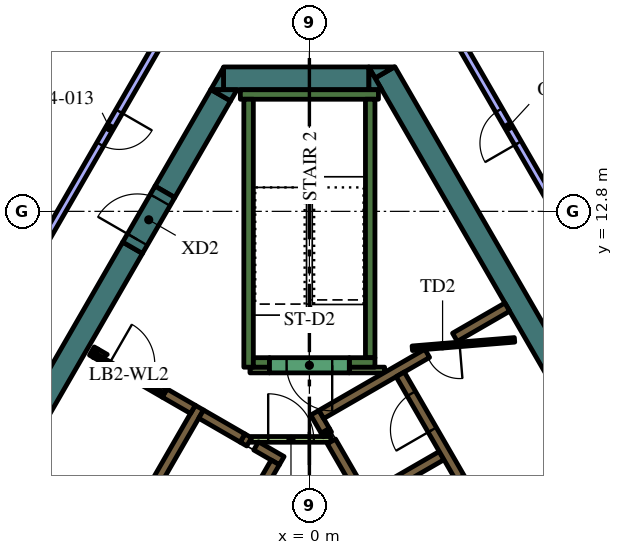
"""IFC4 building model, lengths in metres.
Left out: names, types, materials, properties, quantities, classifications, styles, units other than length and angle.
Written with IfcOpenShell. Run it as: python <this file> out.ifc"""

import sys

from ifc_helpers import new_model, si_unit, direction, frame, frame_2d, origin, place, context, subcontext, project, spatial, polyline, rectangle, outline, extrude, element, fill, save


model = new_model("IFC4")
c1 = context("Model", 3, precision=1e-05, world=origin(), true_north=direction((0.0, 1.0)))
c2 = subcontext(c1, "Body", "Model", "MODEL_VIEW")
j1 = project(units=[si_unit("LENGTHUNIT", "METRE"), si_unit("PLANEANGLEUNIT", "RADIAN")], contexts=[c1])
p1 = place(None, origin())
s1 = spatial("IfcSite", under=j1, at=p1, CompositionType="ELEMENT")
p2 = place(p1, origin())
s2 = spatial("IfcBuilding", under=s1, at=p2, CompositionType="ELEMENT")
p3 = place(p2, frame((0.0, 0.0, 313.2)))
s3 = spatial("IfcBuildingStorey", under=s2, at=p3, CompositionType="ELEMENT", Elevation=313.2)
p4 = place(p3, frame((1.989, 16.456, 0.0), z_axis=(0.0, 0.0, 1.0), x_axis=(0.49999102663, -0.8660305845, 0.0)))
e1 = element("IfcWall", 1, at=p4, inside=s3, PredefinedType="SOLIDWALL", context=c2, shape_type="SweptSolid", body=[
    extrude(rectangle(XDim=12.406, YDim=0.6, at=frame_2d((6.203, 0.0))), origin(), (0.0, 0.0, 1.0), 4.2),
])
p5 = place(p3, origin())
e2 = element("IfcWall", 2, at=p5, inside=s3, PredefinedType="SOLIDWALL", context=c2, shape_type="SweptSolid", body=[
    extrude(outline(polyline([(1.559, 16.6), (2.235, 16.6), (1.728, 16.307), (1.559, 16.6)])), origin(), (0.0, 0.0, 1.0), 4.2),
])
p6 = place(p3, frame((-2.258, 16.3, 0.0), z_axis=(0.0, 0.0, 1.0), x_axis=(1.0, 0.0, 0.0)))
e3 = element("IfcWall", 3, at=p6, inside=s3, PredefinedType="SOLIDWALL", context=c2, shape_type="SweptSolid", body=[
    extrude(rectangle(XDim=3.823, YDim=0.6, at=frame_2d((1.912, 0.0))), origin(), (0.0, 0.0, 1.0), 4.2),
])
e4 = element("IfcWall", 4, at=p5, inside=s3, PredefinedType="SOLIDWALL", context=c2, shape_type="SweptSolid", body=[
    extrude(outline(polyline([(1.905, 16.0), (1.567, 16.0), (1.567, 16.585), (1.905, 16.0)])), origin(), (0.0, 0.0, 1.0), 4.2),
])
e5 = element("IfcWall", 5, at=p5, inside=s3, PredefinedType="SOLIDWALL", context=c2, shape_type="SweptSolid", body=[
    extrude(outline(polyline([(-2.598, 16.0), (-2.26, 16.585), (-2.26, 16.0), (-2.598, 16.0)])), origin(), (0.0, 0.0, 1.0), 4.2),
])
p7 = place(p3, frame((-2.335, 15.855, 0.0), z_axis=(0.0, 0.0, 1.0), x_axis=(-0.499960127962, -0.866048422692, 0.0)))
e6 = element("IfcWall", 6, at=p7, inside=s3, PredefinedType="SOLIDWALL", context=c2, shape_type="SweptSolid", body=[
    extrude(rectangle(XDim=2.934, YDim=0.6, at=frame_2d((1.467, 0.0))), origin(), (0.0, 0.0, 1.0), 4.2),
])
e7 = element("IfcWall", 7, at=p5, inside=s3, PredefinedType="SOLIDWALL", context=c2, shape_type="SweptSolid", body=[
    extrude(outline(polyline([(-1.905, 16.0), (-2.074, 15.707), (-2.581, 16.0), (-1.905, 16.0)])), origin(), (0.0, 0.0, 1.0), 4.2),
])
p8 = place(p3, frame((-12.582, -1.892, 0.0), z_axis=(0.0, 0.0, 1.0), x_axis=(0.500003640647, 0.866023301845, 0.0)))
e8 = element("IfcWall", 8, at=p8, inside=s3, PredefinedType="SOLIDWALL", context=c2, shape_type="SweptSolid", body=[
    extrude(rectangle(XDim=15.858, YDim=0.6, at=frame_2d((7.929, 0.0))), origin(), (0.0, 0.0, 1.0), 4.2),
])
p9 = place(p3, frame((-1.817, 15.875, 0.0), z_axis=(0.0, 0.0, 1.0), x_axis=(1.0, 0.0, 0.0)))
e9 = element("IfcWall", 9, at=p9, inside=s3, PredefinedType="SOLIDWALL", context=c2, shape_type="SweptSolid", body=[
    extrude(rectangle(XDim=3.634, YDim=0.25, at=frame_2d((1.817, 0.0))), origin(), (0.0, 0.0, 1.0), 4.2),
])
p10 = place(p3, frame((1.6, 8.95, 0.0), z_axis=(0.0, 0.0, 1.0), x_axis=(0.0, 1.0, 0.0)))
e10 = element("IfcWall", 10, at=p10, inside=s3, PredefinedType="SOLIDWALL", context=c2, shape_type="SweptSolid", body=[
    extrude(rectangle(XDim=6.8, YDim=0.25, at=frame_2d((3.4, 0.0))), origin(), (0.0, 0.0, 1.0), 4.2),
])
p11 = place(p3, frame((1.05, 8.825, 0.0), z_axis=(0.0, 0.0, 1.0), x_axis=(1.0, 0.0, 0.0)))
e11 = element("IfcWall", 11, at=p11, inside=s3, PredefinedType="SOLIDWALL", context=c2, shape_type="SweptSolid", body=[
    extrude(rectangle(XDim=0.675, YDim=0.25, at=frame_2d((0.337, 0.0))), origin(), (0.0, 0.0, 1.0), 4.2),
])
p12 = place(p3, frame((-1.6, 8.7, 0.0), z_axis=(0.0, 0.0, 1.0), x_axis=(0.0, 1.0, 0.0)))
e12 = element("IfcWall", 12, at=p12, inside=s3, PredefinedType="SOLIDWALL", context=c2, shape_type="SweptSolid", body=[
    extrude(rectangle(XDim=7.05, YDim=0.25, at=frame_2d((3.525, 0.0))), origin(), (0.0, 0.0, 1.0), 4.2),
])
p13 = place(p3, frame((-1.475, 8.825, 0.0), z_axis=(0.0, 0.0, 1.0), x_axis=(1.0, 0.0, 0.0)))
e13 = element("IfcWall", 13, at=p13, inside=s3, PredefinedType="SOLIDWALL", context=c2, shape_type="SweptSolid", body=[
    extrude(rectangle(XDim=0.425, YDim=0.25, at=frame_2d((0.212, 0.0))), origin(), (0.0, 0.0, 1.0), 4.2),
])
p14 = place(p3, frame((0.473, 6.93, 0.0), z_axis=(0.0, 0.0, 1.0), x_axis=(-0.49972245349, 0.866185586049, 0.0)))
e14 = element("IfcWall", 14, at=p14, inside=s3, PredefinedType="SOLIDWALL", context=c2, shape_type="SweptSolid", body=[
    extrude(rectangle(XDim=0.11, YDim=0.25, at=frame_2d((0.055, 0.0))), origin(), (0.0, 0.0, 1.0), 4.2),
])
p15 = place(p3, frame((6.568, -3.627, 0.0), z_axis=(0.0, 0.0, 1.0), x_axis=(-0.499999455981, 0.866025717874, 0.0)))
e15 = element("IfcWall", 15, at=p15, inside=s3, PredefinedType="SOLIDWALL", context=c2, shape_type="SweptSolid", body=[
    extrude(rectangle(XDim=11.978, YDim=0.25, at=frame_2d((5.989, 0.0))), origin(), (0.0, 0.0, 1.0), 4.2),
])
p16 = place(p3, frame((0.417, 7.027, 0.0), z_axis=(0.0, 0.0, 1.0), x_axis=(-0.500210807569, 0.865903659763, 0.0)))
e16 = element("IfcWall", 16, at=p16, inside=s3, PredefinedType="SOLIDWALL", context=c2, shape_type="SweptSolid", body=[
    extrude(rectangle(XDim=0.548, YDim=0.25, at=frame_2d((0.274, 0.0))), origin(), (0.0, 0.0, 1.0), 4.2),
])
p17 = place(p3, frame((3.1, 9.064, 0.0), z_axis=(0.0, 0.0, 1.0), x_axis=(-0.866030133475, -0.499991807846, 0.0)))
e17 = element("IfcWall", 17, at=p17, inside=s3, PredefinedType="SOLIDWALL", context=c2, shape_type="SweptSolid", body=[
    extrude(rectangle(XDim=3.217, YDim=0.25, at=frame_2d((1.608, 0.0))), origin(), (0.0, 0.0, 1.0), 4.2),
])
p18 = place(p3, frame((1.574, 5.274, 0.0), z_axis=(0.0, 0.0, 1.0), x_axis=(0.866028486751, 0.499994660107, 0.0)))
e18 = element("IfcWall", 18, at=p18, inside=s3, PredefinedType="SOLIDWALL", context=c2, shape_type="SweptSolid", body=[
    extrude(rectangle(XDim=2.2, YDim=0.25, at=frame_2d((1.1, 0.0))), origin(), (0.0, 0.0, 1.0), 4.2),
])
p19 = place(p3, frame((3.83, 9.486, 0.0), z_axis=(0.0, 0.0, 1.0), x_axis=(0.865986202621, 0.500067892261, 0.0)))
e19 = element("IfcWall", 19, at=p19, inside=s3, PredefinedType="SOLIDWALL", context=c2, shape_type="SweptSolid", body=[
    extrude(rectangle(XDim=1.591, YDim=0.25, at=frame_2d((0.795, 0.0))), origin(), (0.0, 0.0, 1.0), 4.2),
])
p20 = place(p3, frame((-8.06, -1.311, 0.0), z_axis=(0.0, 0.0, 1.0), x_axis=(0.50000273126, 0.866023826885, 0.0)))
e20 = element("IfcWall", 20, at=p20, inside=s3, PredefinedType="SOLIDWALL", context=c2, shape_type="SweptSolid", body=[
    extrude(rectangle(XDim=10.33, YDim=0.25, at=frame_2d((5.165, 0.0))), origin(), (0.0, 0.0, 1.0), 4.2),
])
p21 = place(p3, frame((-1.758, 6.835, 0.0), z_axis=(0.0, 0.0, 1.0), x_axis=(0.865982457891, -0.500074377092, 0.0)))
e21 = element("IfcWall", 21, at=p21, inside=s3, PredefinedType="SOLIDWALL", context=c2, shape_type="SweptSolid", body=[
    extrude(rectangle(XDim=0.2, YDim=0.25, at=frame_2d((0.1, 0.0))), origin(), (0.0, 0.0, 1.0), 4.2),
])
p22 = place(p3, frame((-1.76, 6.836, 0.0), z_axis=(0.0, 0.0, 1.0), x_axis=(-0.865952863304, 0.500125622755, 0.0)))
e22 = element("IfcWall", 22, at=p22, inside=s3, PredefinedType="SOLIDWALL", context=c2, shape_type="SweptSolid", body=[
    extrude(rectangle(XDim=1.258, YDim=0.25, at=frame_2d((0.629, 0.0))), origin(), (0.0, 0.0, 1.0), 4.2),
])
p23 = place(p3, frame((-0.728, 6.24, 0.0), z_axis=(0.0, 0.0, 1.0), x_axis=(-0.865955664968, 0.500120771724, 0.0)))
e23 = element("IfcWall", 23, at=p23, inside=s3, PredefinedType="SOLIDWALL", context=c2, shape_type="SweptSolid", body=[
    extrude(rectangle(XDim=0.778, YDim=0.25, at=frame_2d((0.389, 0.0))), origin(), (0.0, 0.0, 1.0), 4.2),
])
p24 = place(p3, frame((-5.725, 9.125, 0.0), z_axis=(0.0, 0.0, 1.0), x_axis=(0.866185586049, -0.49972245349, 0.0)))
e24 = element("IfcWall", 24, at=p24, inside=s3, PredefinedType="SOLIDWALL", context=c2, shape_type="SweptSolid", body=[
    extrude(rectangle(XDim=0.11, YDim=0.25, at=frame_2d((0.055, 0.0))), origin(), (0.0, 0.0, 1.0), 4.2),
])
p25 = place(p3, frame((-3.066, 7.59, 0.0), z_axis=(0.0, 0.0, 1.0), x_axis=(-0.866081358704, 0.49990307071, 0.0)))
e25 = element("IfcWall", 25, at=p25, inside=s3, PredefinedType="SOLIDWALL", context=c2, shape_type="SweptSolid", body=[
    extrude(rectangle(XDim=0.858, YDim=0.25, at=frame_2d((0.429, 0.0))), origin(), (0.0, 0.0, 1.0), 4.2),
])
e26 = element("IfcWall", 26, at=p5, inside=s3, PredefinedType="SOLIDWALL", context=c2, shape_type="SweptSolid", body=[
    extrude(outline(polyline([(-3.748, 8.128), (-3.813, 8.015), (-4.027, 8.139), (-4.017, 8.156), (-4.008, 8.173), (-4.0, 8.192), (-3.995, 8.21), (-3.991, 8.23), (-3.99, 8.25), (-3.99, 8.268), (-3.748, 8.128)])), origin(), (0.0, 0.0, 1.0), 4.2),
])
e27 = element("IfcWall", 27, at=p5, inside=s3, PredefinedType="SOLIDWALL", context=c2, shape_type="SweptSolid", body=[
    extrude(outline(polyline([(-5.689, 8.96), (-5.69, 8.961), (-5.565, 9.177), (-5.319, 9.035), (-5.335, 9.026), (-5.351, 9.015), (-5.366, 9.002), (-5.379, 8.988), (-5.392, 8.972), (-5.402, 8.956), (-5.412, 8.939), (-5.629, 9.064), (-5.629, 9.064), (-5.689, 8.96)])), origin(), (0.0, 0.0, 1.0), 4.2),
])
p26 = place(p3, frame((1.05, 8.625, 0.0), z_axis=(0.0, 0.0, 1.0), x_axis=(1.0, 0.0, 0.0)))
e28 = element("IfcWall", 28, at=p26, inside=s3, PredefinedType="PARTITIONING", context=c2, shape_type="SweptSolid", body=[
    extrude(rectangle(XDim=0.929, YDim=0.15, at=frame_2d((0.464, 0.0))), origin(), (0.0, 0.0, 1.0), 3.55),
])
p27 = place(p3, frame((-1.564, 8.625, 0.0), z_axis=(0.0, 0.0, 1.0), x_axis=(1.0, 0.0, 0.0)))
e29 = element("IfcWall", 29, at=p27, inside=s3, PredefinedType="PARTITIONING", context=c2, shape_type="SweptSolid", body=[
    extrude(rectangle(XDim=0.514, YDim=0.15, at=frame_2d((0.257, 0.0))), origin(), (0.0, 0.0, 1.0), 3.55),
])
p28 = place(p3, frame((8.565, -2.185, 0.0), z_axis=(0.0, 0.0, 1.0), x_axis=(-0.499997954832, 0.866026584559, 0.0)))
e30 = element("IfcWall", 30, at=p28, inside=s3, PredefinedType="SOLIDWALL", context=c2, shape_type="SweptSolid", body=[
    extrude(rectangle(XDim=12.35, YDim=0.25, at=frame_2d((6.175, 0.0))), origin(), (0.0, 0.0, 1.0), 4.2),
])
p29 = place(p28, frame((0.685, 0.0, 0.0)))
e31 = element("IfcOpeningElement", 31, at=p29, cuts=e30, PredefinedType="OPENING", context=c2, shape_type="SweptSolid", body=[
    extrude(rectangle(XDim=0.9, YDim=2.1, at=frame_2d((0.45, 1.05))), frame((0.0, 0.135, 0.0), z_axis=(0.0, -1.0, 0.0), x_axis=(1.0, 0.0, 0.0)), (0.0, 0.0, 1.0), 0.27),
])
p30 = place(p28, frame((3.105, 0.0, 0.0)))
e32 = element("IfcOpeningElement", 32, at=p30, cuts=e30, PredefinedType="OPENING", context=c2, shape_type="SweptSolid", body=[
    extrude(rectangle(XDim=1.1, YDim=2.1, at=frame_2d((0.55, 1.05))), frame((0.0, 0.135, 0.0), z_axis=(0.0, -1.0, 0.0), x_axis=(1.0, 0.0, 0.0)), (0.0, 0.0, 1.0), 0.27),
])
p31 = place(p28, frame((5.625, 0.0, 0.0)))
e33 = element("IfcOpeningElement", 33, at=p31, cuts=e30, PredefinedType="OPENING", context=c2, shape_type="SweptSolid", body=[
    extrude(rectangle(XDim=1.1, YDim=2.1, at=frame_2d((0.55, 1.05))), frame((0.0, 0.135, 0.0), z_axis=(0.0, -1.0, 0.0), x_axis=(1.0, 0.0, 0.0)), (0.0, 0.0, 1.0), 0.27),
])
p32 = place(p28, frame((8.145, 0.0, 0.0)))
e34 = element("IfcOpeningElement", 34, at=p32, cuts=e30, PredefinedType="OPENING", context=c2, shape_type="SweptSolid", body=[
    extrude(rectangle(XDim=1.1, YDim=2.1, at=frame_2d((0.55, 1.05))), frame((0.0, 0.135, 0.0), z_axis=(0.0, -1.0, 0.0), x_axis=(1.0, 0.0, 0.0)), (0.0, 0.0, 1.0), 0.27),
])
p33 = place(p28, frame((10.665, 0.0, 0.0)))
e35 = element("IfcOpeningElement", 35, at=p33, cuts=e30, PredefinedType="OPENING", context=c2, shape_type="SweptSolid", body=[
    extrude(rectangle(XDim=1.1, YDim=2.1, at=frame_2d((0.55, 1.05))), frame((0.0, 0.135, 0.0), z_axis=(0.0, -1.0, 0.0), x_axis=(1.0, 0.0, 0.0)), (0.0, 0.0, 1.0), 0.27),
])
p34 = place(p3, frame((-0.898, 6.194, 0.0), z_axis=(0.0, 0.0, 1.0), x_axis=(-0.499996202215, -0.866027596426, 0.0)))
e36 = element("IfcWall", 36, at=p34, inside=s3, PredefinedType="SOLIDWALL", context=c2, shape_type="SweptSolid", body=[
    extrude(rectangle(XDim=9.83, YDim=0.25, at=frame_2d((4.915, 0.0))), origin(), (0.0, 0.0, 1.0), 4.2),
])
p35 = place(p34, frame((0.585, 0.0, 0.0)))
e37 = element("IfcOpeningElement", 37, at=p35, cuts=e36, PredefinedType="OPENING", context=c2, shape_type="SweptSolid", body=[
    extrude(rectangle(XDim=1.1, YDim=2.1, at=frame_2d((0.55, 1.05))), frame((0.0, 0.135, 0.0), z_axis=(0.0, -1.0, 0.0), x_axis=(1.0, 0.0, 0.0)), (0.0, 0.0, 1.0), 0.27),
])
p36 = place(p34, frame((3.105, 0.0, 0.0)))
e38 = element("IfcOpeningElement", 38, at=p36, cuts=e36, PredefinedType="OPENING", context=c2, shape_type="SweptSolid", body=[
    extrude(rectangle(XDim=1.1, YDim=2.1, at=frame_2d((0.55, 1.05))), frame((0.0, 0.135, 0.0), z_axis=(0.0, -1.0, 0.0), x_axis=(1.0, 0.0, 0.0)), (0.0, 0.0, 1.0), 0.27),
])
p37 = place(p34, frame((5.625, 0.0, 0.0)))
e39 = element("IfcOpeningElement", 39, at=p37, cuts=e36, PredefinedType="OPENING", context=c2, shape_type="SweptSolid", body=[
    extrude(rectangle(XDim=1.1, YDim=2.1, at=frame_2d((0.55, 1.05))), frame((0.0, 0.135, 0.0), z_axis=(0.0, -1.0, 0.0), x_axis=(1.0, 0.0, 0.0)), (0.0, 0.0, 1.0), 0.27),
])
p38 = place(p34, frame((8.145, 0.0, 0.0)))
e40 = element("IfcOpeningElement", 40, at=p38, cuts=e36, PredefinedType="OPENING", context=c2, shape_type="SweptSolid", body=[
    extrude(rectangle(XDim=1.1, YDim=2.1, at=frame_2d((0.55, 1.05))), frame((0.0, 0.135, 0.0), z_axis=(0.0, -1.0, 0.0), x_axis=(1.0, 0.0, 0.0)), (0.0, 0.0, 1.0), 0.27),
])
p39 = place(p3, frame((1.05, 8.75, 0.0), z_axis=(0.0, 0.0, 1.0), x_axis=(-1.0, 0.0, 0.0)))
e41 = element("IfcWall", 41, at=p39, inside=s3, PredefinedType="SOLIDWALL", context=c2, shape_type="SweptSolid", body=[
    extrude(rectangle(XDim=2.1, YDim=0.4, at=frame_2d((1.05, 0.0))), origin(), (0.0, 0.0, 1.0), 4.2),
])
p40 = place(p39, frame((0.45, 0.0, 0.0)))
e42 = element("IfcOpeningElement", 42, at=p40, cuts=e41, PredefinedType="OPENING", context=c2, shape_type="SweptSolid", body=[
    extrude(rectangle(XDim=1.2, YDim=2.1, at=frame_2d((0.6, 1.05))), frame((0.0, 0.21, 0.0), z_axis=(0.0, -1.0, 0.0), x_axis=(1.0, 0.0, 0.0)), (0.0, 0.0, 1.0), 0.42),
])
p41 = place(p3, frame((5.398, 9.419, 0.0), z_axis=(0.0, 0.0, 1.0), x_axis=(-0.996653416376, -0.081743303248, 0.0)))
e43 = element("IfcWall", 43, at=p41, inside=s3, PredefinedType="PARTITIONING", context=c2, shape_type="SweptSolid", body=[
    extrude(rectangle(XDim=2.7, YDim=0.12, at=frame_2d((1.35, 0.0))), origin(), (0.0, 0.0, 1.0), 3.55),
])
p42 = place(p41, frame((1.45, 0.0, 0.0)))
e44 = element("IfcOpeningElement", 44, at=p42, cuts=e43, PredefinedType="OPENING", context=c2, shape_type="SweptSolid", body=[
    extrude(rectangle(XDim=0.9, YDim=2.1, at=frame_2d((0.45, 1.05))), frame((0.0, 0.07, 0.0), z_axis=(0.0, -1.0, 0.0), x_axis=(1.0, 0.0, 0.0)), (0.0, 0.0, 1.0), 0.14),
])
p43 = place(p3, frame((-1.534, 6.8, 0.0), z_axis=(0.0, 0.0, 1.0), x_axis=(1.0, 0.0, 0.0)))
e45 = element("IfcWall", 45, at=p43, inside=s3, PredefinedType="PARTITIONING", context=c2, shape_type="SweptSolid", body=[
    extrude(rectangle(XDim=2.1, YDim=0.15, at=frame_2d((1.05, 0.0))), origin(), (0.0, 0.0, 1.0), 3.55),
])
p44 = place(p43, frame((0.45, 0.0, 0.0)))
e46 = element("IfcOpeningElement", 46, at=p44, cuts=e45, PredefinedType="OPENING", context=c2, shape_type="SweptSolid", body=[
    extrude(rectangle(XDim=1.2, YDim=2.1, at=frame_2d((0.6, 1.05))), frame((0.0, 0.085, 0.0), z_axis=(0.0, -1.0, 0.0), x_axis=(1.0, 0.0, 0.0)), (0.0, 0.0, 1.0), 0.17),
])
p45 = place(p3, frame((-5.659, 9.012, 0.0), z_axis=(0.0, 0.0, 1.0), x_axis=(0.866009402589, -0.500027713859, 0.0)))
e47 = element("IfcWall", 47, at=p45, inside=s3, PredefinedType="PARTITIONING", context=c2, shape_type="SweptSolid", body=[
    extrude(rectangle(XDim=2.1, YDim=0.12, at=frame_2d((1.05, 0.0))), origin(), (0.0, 0.0, 1.0), 3.55),
])
p46 = place(p45, frame((0.45, 0.0, 0.0)))
e48 = element("IfcOpeningElement", 48, at=p46, cuts=e47, PredefinedType="OPENING", context=c2, shape_type="SweptSolid", body=[
    extrude(rectangle(XDim=1.2, YDim=2.1, at=frame_2d((0.6, 1.05))), frame((0.0, 0.07, 0.0), z_axis=(0.0, -1.0, 0.0), x_axis=(1.0, 0.0, 0.0)), (0.0, 0.0, 1.0), 0.14),
])
p47 = place(p3, frame((-4.652, 11.842, 0.0), z_axis=(0.0, 0.0, 1.0), x_axis=(0.500062241894, 0.865989465428, 0.0)))
e49 = element("IfcWall", 49, at=p47, inside=s3, PredefinedType="SOLIDWALL", context=c2, shape_type="SweptSolid", body=[
    extrude(rectangle(XDim=1.7, YDim=0.6, at=frame_2d((0.85, 0.0))), origin(), (0.0, 0.0, 1.0), 4.2),
])
p48 = place(p47, frame((0.25, 0.0, 0.0)))
e50 = element("IfcOpeningElement", 50, at=p48, cuts=e49, PredefinedType="OPENING", context=c2, shape_type="SweptSolid", body=[
    extrude(rectangle(XDim=1.2, YDim=2.1, at=frame_2d((0.6, 1.05))), frame((0.0, 0.31, 0.0), z_axis=(0.0, -1.0, 0.0), x_axis=(1.0, 0.0, 0.0)), (0.0, 0.0, 1.0), 0.62),
])
p49 = place(p3, frame((7.188, 11.65, 0.0), z_axis=(0.0, 0.0, 1.0), x_axis=(-0.499986368499, 0.866033273792, 0.0)))
e51 = element("IfcWall", 51, at=p49, inside=s3, PredefinedType="PARTITIONING", context=c2, shape_type="SweptSolid", body=[
    extrude(rectangle(XDim=7.794, YDim=0.2, at=frame_2d((3.897, 0.0))), origin(), (0.0, 0.0, 1.0), 3.55),
])
p50 = place(p49, frame((3.4, 0.0, 0.0)))
e52 = element("IfcOpeningElement", 52, at=p50, cuts=e51, PredefinedType="OPENING", context=c2, shape_type="SweptSolid", body=[
    extrude(rectangle(XDim=1.0, YDim=2.1, at=frame_2d((0.5, 1.05))), frame((0.0, 0.11, 0.0), z_axis=(0.0, -1.0, 0.0), x_axis=(1.0, 0.0, 0.0)), (0.0, 0.0, 1.0), 0.22),
])
p51 = place(p3, frame((-8.544, 15.69, 0.0), z_axis=(0.0, 0.0, 1.0), x_axis=(0.599538824769, 0.800345673815, 0.0)))
e53 = element("IfcWall", 53, at=p51, inside=s3, PredefinedType="PARTITIONING", context=c2, shape_type="SweptSolid", body=[
    extrude(rectangle(XDim=3.474, YDim=0.15, at=frame_2d((1.737, 0.0))), origin(), (0.0, 0.0, 1.0), 3.55),
])
p52 = place(p51, frame((1.274, 0.0, 0.0)))
e54 = element("IfcOpeningElement", 54, at=p52, cuts=e53, PredefinedType="OPENING", context=c2, shape_type="SweptSolid", body=[
    extrude(rectangle(XDim=0.9, YDim=2.1, at=frame_2d((0.45, 1.05))), frame((0.0, 0.085, 0.0), z_axis=(0.0, -1.0, 0.0), x_axis=(1.0, 0.0, 0.0)), (0.0, 0.0, 1.0), 0.17),
])
p53 = place(p3, frame((-3.306, 18.374, 0.0), z_axis=(0.0, 0.0, 1.0), x_axis=(-0.500000072396, -0.866025361987, 0.0)))
e55 = element("IfcWall", 55, at=p53, inside=s3, PredefinedType="PARTITIONING", context=c2, shape_type="SweptSolid", body=[
    extrude(rectangle(XDim=7.739, YDim=0.2, at=frame_2d((3.87, 0.0))), origin(), (0.0, 0.0, 1.0), 3.55),
])
p54 = place(p53, frame((3.4, 0.0, 0.0)))
e56 = element("IfcOpeningElement", 56, at=p54, cuts=e55, PredefinedType="OPENING", context=c2, shape_type="SweptSolid", body=[
    extrude(rectangle(XDim=1.0, YDim=2.1, at=frame_2d((0.5, 1.05))), frame((0.0, 0.11, 0.0), z_axis=(0.0, -1.0, 0.0), x_axis=(1.0, 0.0, 0.0)), (0.0, 0.0, 1.0), 0.22),
])
p55 = place(p33, origin())
e57 = element("IfcDoor", 57, at=p55, inside=s3, OperationType="DOUBLE_DOOR_SLIDING", PredefinedType="DOOR", context=c2, shape_type="SweptSolid", body=[
    extrude(rectangle(XDim=1.1, YDim=2.1, at=frame_2d((0.55, 1.05))), frame((0.0, 0.025, 0.0), z_axis=(0.0, -1.0, 0.0), x_axis=(1.0, 0.0, 0.0)), (0.0, 0.0, 1.0), 0.05),
])
fill(e35, e57)
p56 = place(p40, origin())
e58 = element("IfcDoor", 58, at=p56, inside=s3, OperationType="SINGLE_SWING_LEFT", PredefinedType="DOOR", context=c2, shape_type="SweptSolid", body=[
    extrude(rectangle(XDim=1.2, YDim=2.1, at=frame_2d((0.6, 1.05))), frame((0.0, 0.025, 0.0), z_axis=(0.0, -1.0, 0.0), x_axis=(1.0, 0.0, 0.0)), (0.0, 0.0, 1.0), 0.05),
])
fill(e42, e58)
p57 = place(p42, origin())
e59 = element("IfcDoor", 59, at=p57, inside=s3, OperationType="SINGLE_SWING_LEFT", PredefinedType="DOOR", context=c2, shape_type="SweptSolid", body=[
    extrude(rectangle(XDim=0.9, YDim=2.1, at=frame_2d((0.45, 1.05))), frame((0.0, 0.025, 0.0), z_axis=(0.0, -1.0, 0.0), x_axis=(1.0, 0.0, 0.0)), (0.0, 0.0, 1.0), 0.05),
])
fill(e44, e59)
p58 = place(p44, origin())
e60 = element("IfcDoor", 60, at=p58, inside=s3, OperationType="SINGLE_SWING_LEFT", PredefinedType="DOOR", context=c2, shape_type="SweptSolid", body=[
    extrude(rectangle(XDim=1.2, YDim=2.1, at=frame_2d((0.6, 1.05))), frame((0.0, 0.025, 0.0), z_axis=(0.0, -1.0, 0.0), x_axis=(1.0, 0.0, 0.0)), (0.0, 0.0, 1.0), 0.05),
])
fill(e46, e60)
p59 = place(p46, origin())
e61 = element("IfcDoor", 61, at=p59, inside=s3, OperationType="SINGLE_SWING_LEFT", PredefinedType="DOOR", context=c2, shape_type="SweptSolid", body=[
    extrude(rectangle(XDim=1.2, YDim=2.1, at=frame_2d((0.6, 1.05))), frame((0.0, 0.025, 0.0), z_axis=(0.0, -1.0, 0.0), x_axis=(1.0, 0.0, 0.0)), (0.0, 0.0, 1.0), 0.05),
])
fill(e48, e61)
p60 = place(p48, origin())
e62 = element("IfcDoor", 62, at=p60, inside=s3, OperationType="SINGLE_SWING_LEFT", PredefinedType="DOOR", context=c2, shape_type="SweptSolid", body=[
    extrude(rectangle(XDim=1.2, YDim=2.1, at=frame_2d((0.6, 1.05))), frame((0.0, 0.025, 0.0), z_axis=(0.0, -1.0, 0.0), x_axis=(1.0, 0.0, 0.0)), (0.0, 0.0, 1.0), 0.05),
])
fill(e50, e62)
p61 = place(p50, origin())
e63 = element("IfcDoor", 63, at=p61, inside=s3, OperationType="SINGLE_SWING_RIGHT", PredefinedType="DOOR", context=c2, shape_type="SweptSolid", body=[
    extrude(rectangle(XDim=1.0, YDim=2.1, at=frame_2d((0.5, 1.05))), frame((0.0, 0.025, 0.0), z_axis=(0.0, -1.0, 0.0), x_axis=(1.0, 0.0, 0.0)), (0.0, 0.0, 1.0), 0.05),
])
fill(e52, e63)
p62 = place(p54, origin())
e64 = element("IfcDoor", 64, at=p62, inside=s3, OperationType="SINGLE_SWING_RIGHT", PredefinedType="DOOR", context=c2, shape_type="SweptSolid", body=[
    extrude(rectangle(XDim=1.0, YDim=2.1, at=frame_2d((0.5, 1.05))), frame((0.0, 0.025, 0.0), z_axis=(0.0, -1.0, 0.0), x_axis=(1.0, 0.0, 0.0)), (0.0, 0.0, 1.0), 0.05),
])
fill(e56, e64)
save(model, sys.argv[1])
